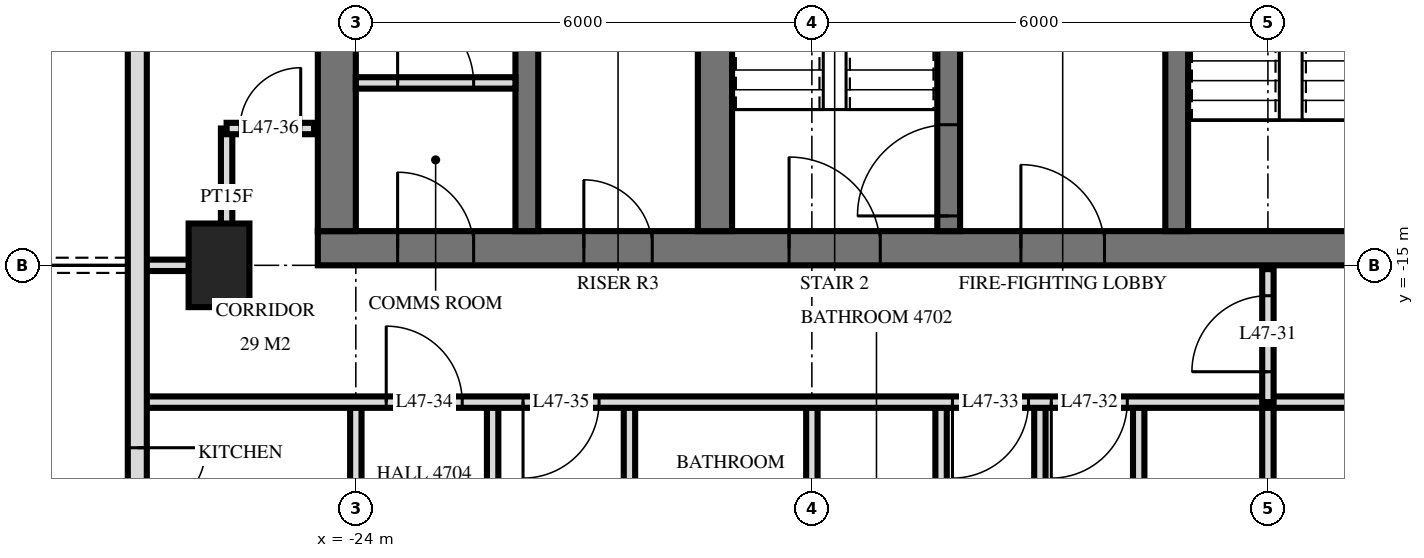
"""IFC4 building model, lengths in metres.
Left out: names, types, materials, properties, quantities, classifications, styles, units other than length and angle.
Written with IfcOpenShell. Run it as: python <this file> out.ifc"""

import sys

from ifc_helpers import new_model, si_unit, direction, frame, frame_2d, origin, origin_2d, place, context, subcontext, project, spatial, rectangle, extrude, element, fill, save


model = new_model("IFC4")
c1 = context("Model", 3, precision=1e-05, world=origin(), true_north=direction((0.0, 1.0)))
c2 = subcontext(c1, "Body", "Model", "MODEL_VIEW")
j1 = project(units=[si_unit("LENGTHUNIT", "METRE"), si_unit("PLANEANGLEUNIT", "RADIAN")], contexts=[c1])
p1 = place(None, origin())
s1 = spatial("IfcSite", under=j1, at=p1, CompositionType="ELEMENT")
p2 = place(p1, origin())
s2 = spatial("IfcBuilding", under=s1, at=p2, CompositionType="ELEMENT")
p3 = place(p2, frame((0.0, 0.0, 183.6)))
s3 = spatial("IfcBuildingStorey", under=s2, at=p3, CompositionType="ELEMENT", Elevation=183.6)
p4 = place(p3, frame((-25.8, -15.0, -0.28), z_axis=(0.0, 0.0, 1.0), x_axis=(0.0, 1.0, 0.0)))
e1 = element("IfcColumn", 1, at=p4, inside=s3, PredefinedType="COLUMN", context=c2, shape_type="SweptSolid", body=[
    extrude(rectangle(XDim=1.1, YDim=0.8, at=origin_2d()), origin(), (0.0, 0.0, 1.0), 3.78),
])
p5 = place(p3, frame((-24.5, -14.775, 0.0), z_axis=(0.0, 0.0, 1.0), x_axis=(1.0, 0.0, 0.0)))
e2 = element("IfcWall", 2, at=p5, inside=s3, PredefinedType="SHEAR", context=c2, shape_type="SweptSolid", body=[
    extrude(rectangle(XDim=14.5, YDim=0.45, at=frame_2d((7.25, 0.0))), origin(), (0.0, 0.0, 1.0), 3.5),
])
p6 = place(p5, frame((6.2, 0.0, 0.0)))
e3 = element("IfcOpeningElement", 3, at=p6, cuts=e2, PredefinedType="OPENING", context=c2, shape_type="SweptSolid", body=[
    extrude(rectangle(XDim=1.2, YDim=2.1, at=frame_2d((0.6, 1.05))), frame((0.0, 0.235, 0.0), z_axis=(0.0, -1.0, 0.0), x_axis=(1.0, 0.0, 0.0)), (0.0, 0.0, 1.0), 0.47),
])
p7 = place(p5, frame((9.25, 0.0, 0.0)))
e4 = element("IfcOpeningElement", 4, at=p7, cuts=e2, PredefinedType="OPENING", context=c2, shape_type="SweptSolid", body=[
    extrude(rectangle(XDim=1.1, YDim=2.1, at=frame_2d((0.55, 1.05))), frame((0.0, 0.235, 0.0), z_axis=(0.0, -1.0, 0.0), x_axis=(1.0, 0.0, 0.0)), (0.0, 0.0, 1.0), 0.47),
])
p8 = place(p5, frame((3.5, 0.0, 0.0)))
e5 = element("IfcOpeningElement", 5, at=p8, cuts=e2, PredefinedType="OPENING", context=c2, shape_type="SweptSolid", body=[
    extrude(rectangle(XDim=0.9, YDim=2.1, at=frame_2d((0.45, 1.05))), frame((0.0, 0.235, 0.0), z_axis=(0.0, -1.0, 0.0), x_axis=(1.0, 0.0, 0.0)), (0.0, 0.0, 1.0), 0.47),
])
p9 = place(p5, frame((1.05, 0.0, 0.0)))
e6 = element("IfcOpeningElement", 6, at=p9, cuts=e2, PredefinedType="OPENING", context=c2, shape_type="SweptSolid", body=[
    extrude(rectangle(XDim=1.0, YDim=2.1, at=frame_2d((0.5, 1.05))), frame((0.0, 0.235, 0.0), z_axis=(0.0, -1.0, 0.0), x_axis=(1.0, 0.0, 0.0)), (0.0, 0.0, 1.0), 0.47),
])
p10 = place(p3, frame((-24.25, -14.55, 0.0), z_axis=(0.0, 0.0, 1.0), x_axis=(0.0, 1.0, 0.0)))
e7 = element("IfcWall", 7, at=p10, inside=s3, PredefinedType="SHEAR", context=c2, shape_type="SweptSolid", body=[
    extrude(rectangle(XDim=14.1, YDim=0.5, at=frame_2d((7.05, 0.0))), origin(), (0.0, 0.0, 1.0), 3.5),
])
p11 = place(p3, frame((-13.2, -14.55, 0.0), z_axis=(0.0, 0.0, 1.0), x_axis=(0.0, 1.0, 0.0)))
e8 = element("IfcWall", 8, at=p11, inside=s3, PredefinedType="SHEAR", context=c2, shape_type="SweptSolid", body=[
    extrude(rectangle(XDim=5.4, YDim=0.3, at=frame_2d((2.7, 0.0))), origin(), (0.0, 0.0, 1.0), 3.5),
])
p12 = place(p11, frame((4.0, 0.0, 0.0)))
e9 = element("IfcOpeningElement", 9, at=p12, cuts=e8, PredefinedType="OPENING", context=c2, shape_type="SweptSolid", body=[
    extrude(rectangle(XDim=1.2, YDim=2.1, at=frame_2d((0.6, 1.05))), frame((0.0, 0.16, 0.0), z_axis=(0.0, -1.0, 0.0), x_axis=(1.0, 0.0, 0.0)), (0.0, 0.0, 1.0), 0.32),
])
p13 = place(p3, frame((-16.2, -14.55, 0.0), z_axis=(0.0, 0.0, 1.0), x_axis=(0.0, 1.0, 0.0)))
e10 = element("IfcWall", 10, at=p13, inside=s3, PredefinedType="SHEAR", context=c2, shape_type="SweptSolid", body=[
    extrude(rectangle(XDim=5.4, YDim=0.3, at=frame_2d((2.7, 0.0))), origin(), (0.0, 0.0, 1.0), 3.5),
])
p14 = place(p13, frame((0.2, 0.0, 0.0)))
e11 = element("IfcOpeningElement", 11, at=p14, cuts=e10, PredefinedType="OPENING", context=c2, shape_type="SweptSolid", body=[
    extrude(rectangle(XDim=1.2, YDim=2.1, at=frame_2d((0.6, 1.05))), frame((0.0, 0.16, 0.0), z_axis=(0.0, -1.0, 0.0), x_axis=(1.0, 0.0, 0.0)), (0.0, 0.0, 1.0), 0.32),
])
p15 = place(p3, frame((-19.275, -14.55, 0.0), z_axis=(0.0, 0.0, 1.0), x_axis=(0.0, 1.0, 0.0)))
e12 = element("IfcWall", 12, at=p15, inside=s3, PredefinedType="SHEAR", context=c2, shape_type="SweptSolid", body=[
    extrude(rectangle(XDim=5.4, YDim=0.45, at=frame_2d((2.7, 0.0))), origin(), (0.0, 0.0, 1.0), 3.5),
])
p16 = place(p3, frame((-21.75, -14.55, 0.0), z_axis=(0.0, 0.0, 1.0), x_axis=(0.0, 1.0, 0.0)))
e13 = element("IfcWall", 13, at=p16, inside=s3, PredefinedType="SHEAR", context=c2, shape_type="SweptSolid", body=[
    extrude(rectangle(XDim=5.4, YDim=0.3, at=frame_2d((2.7, 0.0))), origin(), (0.0, 0.0, 1.0), 3.5),
])
p17 = place(p3, frame((-26.875, -3.325, 0.0), z_axis=(0.0, 0.0, 1.0), x_axis=(0.0, -1.0, 0.0)))
e14 = element("IfcWall", 14, at=p17, inside=s3, PredefinedType="SOLIDWALL", context=c2, shape_type="SweptSolid", body=[
    extrude(rectangle(XDim=21.551, YDim=0.25, at=frame_2d((10.775, 0.0))), origin(), (0.0, 0.0, 1.0), 3.22),
])
p18 = place(p17, frame((7.025, 0.0, 0.0)))
e15 = element("IfcOpeningElement", 15, at=p18, cuts=e14, PredefinedType="OPENING", context=c2, shape_type="SweptSolid", body=[
    extrude(rectangle(XDim=1.8, YDim=2.4, at=frame_2d((0.9, 1.2))), frame((0.0, 0.135, 0.0), z_axis=(0.0, -1.0, 0.0), x_axis=(1.0, 0.0, 0.0)), (0.0, 0.0, 1.0), 0.27),
])
p19 = place(p17, frame((14.075, 0.0, 0.0)))
e16 = element("IfcOpeningElement", 16, at=p19, cuts=e14, PredefinedType="OPENING", context=c2, shape_type="SweptSolid", body=[
    extrude(rectangle(XDim=1.8, YDim=2.4, at=frame_2d((0.9, 1.2))), frame((0.0, 0.135, 0.0), z_axis=(0.0, -1.0, 0.0), x_axis=(1.0, 0.0, 0.0)), (0.0, 0.0, 1.0), 0.27),
])
p20 = place(p17, frame((18.875, 0.0, 0.0)))
e17 = element("IfcOpeningElement", 17, at=p20, cuts=e14, PredefinedType="OPENING", context=c2, shape_type="SweptSolid", body=[
    extrude(rectangle(XDim=1.8, YDim=2.4, at=frame_2d((0.9, 1.2))), frame((0.0, 0.135, 0.0), z_axis=(0.0, -1.0, 0.0), x_axis=(1.0, 0.0, 0.0)), (0.0, 0.0, 1.0), 0.27),
])
p21 = place(p3, frame((-24.0, -12.6, 0.0), z_axis=(0.0, 0.0, 1.0), x_axis=(1.0, 0.0, 0.0)))
e18 = element("IfcWall", 18, at=p21, inside=s3, PredefinedType="PARTITIONING", context=c2, shape_type="SweptSolid", body=[
    extrude(rectangle(XDim=2.1, YDim=0.15, at=frame_2d((1.05, 0.0))), origin(), (0.0, 0.0, 1.0), 3.2),
])
p22 = place(p21, frame((0.55, 0.0, 0.0)))
e19 = element("IfcOpeningElement", 19, at=p22, cuts=e18, PredefinedType="OPENING", context=c2, shape_type="SweptSolid", body=[
    extrude(rectangle(XDim=1.0, YDim=2.1, at=frame_2d((0.5, 1.05))), frame((0.0, 0.085, 0.0), z_axis=(0.0, -1.0, 0.0), x_axis=(1.0, 0.0, 0.0)), (0.0, 0.0, 1.0), 0.17),
])
p23 = place(p3, frame((-12.0, -16.8, 0.0), z_axis=(0.0, 0.0, 1.0), x_axis=(0.0, 1.0, 0.0)))
e20 = element("IfcWall", 20, at=p23, inside=s3, PredefinedType="PARTITIONING", context=c2, shape_type="SweptSolid", body=[
    extrude(rectangle(XDim=1.75, YDim=0.15, at=frame_2d((0.875, 0.0))), origin(), (0.0, 0.0, 1.0), 3.22),
])
p24 = place(p23, frame((0.4, 0.0, 0.0)))
e21 = element("IfcOpeningElement", 21, at=p24, cuts=e20, PredefinedType="OPENING", context=c2, shape_type="SweptSolid", body=[
    extrude(rectangle(XDim=1.0, YDim=2.1, at=frame_2d((0.5, 1.05))), frame((0.0, 0.085, 0.0), z_axis=(0.0, -1.0, 0.0), x_axis=(1.0, 0.0, 0.0)), (0.0, 0.0, 1.0), 0.17),
])
p25 = place(p3, frame((-12.0, -29.22, 0.0), z_axis=(0.0, 0.0, 1.0), x_axis=(0.0, 1.0, 0.0)))
e22 = element("IfcWall", 22, at=p25, inside=s3, PredefinedType="PARTITIONING", context=c2, shape_type="SweptSolid", body=[
    extrude(rectangle(XDim=12.42, YDim=0.15, at=frame_2d((6.21, 0.0))), origin(), (0.0, 0.0, 1.0), 3.22),
])
p26 = place(p3, frame((-13.7, -19.8, 0.0), z_axis=(0.0, 0.0, 1.0), x_axis=(0.0, 1.0, 0.0)))
e23 = element("IfcWall", 23, at=p26, inside=s3, PredefinedType="PARTITIONING", context=c2, shape_type="SweptSolid", body=[
    extrude(rectangle(XDim=3.0, YDim=0.15, at=frame_2d((1.5, 0.0))), origin(), (0.0, 0.0, 1.0), 3.22),
])
p27 = place(p26, frame((1.1, 0.0, 0.0)))
e24 = element("IfcOpeningElement", 24, at=p27, cuts=e23, PredefinedType="OPENING", context=c2, shape_type="SweptSolid", body=[
    extrude(rectangle(XDim=0.8, YDim=2.1, at=frame_2d((0.4, 1.05))), frame((0.0, 0.085, 0.0), z_axis=(0.0, -1.0, 0.0), x_axis=(1.0, 0.0, 0.0)), (0.0, 0.0, 1.0), 0.17),
])
p28 = place(p3, frame((-15.0, -29.22, 0.0), z_axis=(0.0, 0.0, 1.0), x_axis=(0.0, 1.0, 0.0)))
e25 = element("IfcWall", 25, at=p28, inside=s3, PredefinedType="PARTITIONING", context=c2, shape_type="SweptSolid", body=[
    extrude(rectangle(XDim=12.42, YDim=0.15, at=frame_2d((6.21, 0.0))), origin(), (0.0, 0.0, 1.0), 3.22),
])
p29 = place(p3, frame((-16.3, -19.8, 0.0), z_axis=(0.0, 0.0, 1.0), x_axis=(0.0, 1.0, 0.0)))
e26 = element("IfcWall", 26, at=p29, inside=s3, PredefinedType="PARTITIONING", context=c2, shape_type="SweptSolid", body=[
    extrude(rectangle(XDim=3.0, YDim=0.15, at=frame_2d((1.5, 0.0))), origin(), (0.0, 0.0, 1.0), 3.22),
])
p30 = place(p29, frame((1.1, 0.0, 0.0)))
e27 = element("IfcOpeningElement", 27, at=p30, cuts=e26, PredefinedType="OPENING", context=c2, shape_type="SweptSolid", body=[
    extrude(rectangle(XDim=0.8, YDim=2.1, at=frame_2d((0.4, 1.05))), frame((0.0, 0.085, 0.0), z_axis=(0.0, -1.0, 0.0), x_axis=(1.0, 0.0, 0.0)), (0.0, 0.0, 1.0), 0.17),
])
p31 = place(p3, frame((-18.0, -29.22, 0.0), z_axis=(0.0, 0.0, 1.0), x_axis=(0.0, 1.0, 0.0)))
e28 = element("IfcWall", 28, at=p31, inside=s3, PredefinedType="PARTITIONING", context=c2, shape_type="SweptSolid", body=[
    extrude(rectangle(XDim=12.42, YDim=0.15, at=frame_2d((6.21, 0.0))), origin(), (0.0, 0.0, 1.0), 3.22),
])
for number, where, z_axis, x_axis in (
    (29, (-20.4, -19.8, 0.0), (0.0, 0.0, 1.0), (0.0, 1.0, 0.0)),
    (30, (-22.2, -19.8, 0.0), (0.0, 0.0, 1.0), (0.0, 1.0, 0.0)),
):
    element("IfcWall", number, at=place(p3, frame(where, z_axis=z_axis, x_axis=x_axis)), inside=s3, PredefinedType="PARTITIONING", context=c2, shape_type="SweptSolid", body=[
        extrude(rectangle(XDim=3.0, YDim=0.15, at=frame_2d((1.5, 0.0))), origin(), (0.0, 0.0, 1.0), 3.22),
    ])
p32 = place(p3, frame((-24.0, -19.8, 0.0), z_axis=(0.0, 0.0, 1.0), x_axis=(0.0, 1.0, 0.0)))
e31 = element("IfcWall", 31, at=p32, inside=s3, PredefinedType="PARTITIONING", context=c2, shape_type="SweptSolid", body=[
    extrude(rectangle(XDim=3.0, YDim=0.15, at=frame_2d((1.5, 0.0))), origin(), (0.0, 0.0, 1.0), 3.22),
])
p33 = place(p32, frame((0.98, 0.0, 0.0)))
e32 = element("IfcOpeningElement", 32, at=p33, cuts=e31, PredefinedType="OPENING", context=c2, shape_type="SweptSolid", body=[
    extrude(rectangle(XDim=1.0, YDim=2.1, at=frame_2d((0.5, 1.05))), frame((0.0, 0.085, 0.0), z_axis=(0.0, -1.0, 0.0), x_axis=(1.0, 0.0, 0.0)), (0.0, 0.0, 1.0), 0.17),
])
p34 = place(p3, frame((-25.7, -15.0, 0.0), z_axis=(0.0, 0.0, 1.0), x_axis=(0.0, 1.0, 0.0)))
e33 = element("IfcWall", 33, at=p34, inside=s3, PredefinedType="PARTITIONING", context=c2, shape_type="SweptSolid", body=[
    extrude(rectangle(XDim=1.8, YDim=0.15, at=frame_2d((0.9, 0.0))), origin(), (0.0, 0.0, 1.0), 3.22),
])
p35 = place(p3, frame((-26.82, -16.8, 0.0), z_axis=(0.0, 0.0, 1.0), x_axis=(1.0, 0.0, 0.0)))
e34 = element("IfcWall", 34, at=p35, inside=s3, PredefinedType="PARTITIONING", context=c2, shape_type="SweptSolid", body=[
    extrude(rectangle(XDim=53.64, YDim=0.15, at=frame_2d((26.82, 0.0))), origin(), (0.0, 0.0, 1.0), 3.22),
])
p36 = place(p35, frame((11.97, 0.0, 0.0)))
e35 = element("IfcOpeningElement", 35, at=p36, cuts=e34, PredefinedType="OPENING", context=c2, shape_type="SweptSolid", body=[
    extrude(rectangle(XDim=1.0, YDim=2.1, at=frame_2d((0.5, 1.05))), frame((0.0, 0.085, 0.0), z_axis=(0.0, -1.0, 0.0), x_axis=(1.0, 0.0, 0.0)), (0.0, 0.0, 1.0), 0.17),
])
p37 = place(p35, frame((10.67, 0.0, 0.0)))
e36 = element("IfcOpeningElement", 36, at=p37, cuts=e34, PredefinedType="OPENING", context=c2, shape_type="SweptSolid", body=[
    extrude(rectangle(XDim=1.0, YDim=2.1, at=frame_2d((0.5, 1.05))), frame((0.0, 0.085, 0.0), z_axis=(0.0, -1.0, 0.0), x_axis=(1.0, 0.0, 0.0)), (0.0, 0.0, 1.0), 0.17),
])
p38 = place(p35, frame((3.22, 0.0, 0.0)))
e37 = element("IfcOpeningElement", 37, at=p38, cuts=e34, PredefinedType="OPENING", context=c2, shape_type="SweptSolid", body=[
    extrude(rectangle(XDim=1.0, YDim=2.1, at=frame_2d((0.5, 1.05))), frame((0.0, 0.085, 0.0), z_axis=(0.0, -1.0, 0.0), x_axis=(1.0, 0.0, 0.0)), (0.0, 0.0, 1.0), 0.17),
])
p39 = place(p35, frame((5.02, 0.0, 0.0)))
e38 = element("IfcOpeningElement", 38, at=p39, cuts=e34, PredefinedType="OPENING", context=c2, shape_type="SweptSolid", body=[
    extrude(rectangle(XDim=1.0, YDim=2.1, at=frame_2d((0.5, 1.05))), frame((0.0, 0.085, 0.0), z_axis=(0.0, -1.0, 0.0), x_axis=(1.0, 0.0, 0.0)), (0.0, 0.0, 1.0), 0.17),
])
p40 = place(p35, frame((38.97, 0.0, 0.0)))
e39 = element("IfcOpeningElement", 39, at=p40, cuts=e34, PredefinedType="OPENING", context=c2, shape_type="SweptSolid", body=[
    extrude(rectangle(XDim=1.0, YDim=2.1, at=frame_2d((0.5, 1.05))), frame((0.0, 0.085, 0.0), z_axis=(0.0, -1.0, 0.0), x_axis=(1.0, 0.0, 0.0)), (0.0, 0.0, 1.0), 0.17),
])
p41 = place(p35, frame((48.72, 0.0, 0.0)))
e40 = element("IfcOpeningElement", 40, at=p41, cuts=e34, PredefinedType="OPENING", context=c2, shape_type="SweptSolid", body=[
    extrude(rectangle(XDim=1.0, YDim=2.1, at=frame_2d((0.5, 1.05))), frame((0.0, 0.085, 0.0), z_axis=(0.0, -1.0, 0.0), x_axis=(1.0, 0.0, 0.0)), (0.0, 0.0, 1.0), 0.17),
])
p42 = place(p35, frame((46.92, 0.0, 0.0)))
e41 = element("IfcOpeningElement", 41, at=p42, cuts=e34, PredefinedType="OPENING", context=c2, shape_type="SweptSolid", body=[
    extrude(rectangle(XDim=1.0, YDim=2.1, at=frame_2d((0.5, 1.05))), frame((0.0, 0.085, 0.0), z_axis=(0.0, -1.0, 0.0), x_axis=(1.0, 0.0, 0.0)), (0.0, 0.0, 1.0), 0.17),
])
p43 = place(p35, frame((18.32, 0.0, 0.0)))
e42 = element("IfcOpeningElement", 42, at=p43, cuts=e34, PredefinedType="OPENING", context=c2, shape_type="SweptSolid", body=[
    extrude(rectangle(XDim=1.0, YDim=2.1, at=frame_2d((0.5, 1.05))), frame((0.0, 0.085, 0.0), z_axis=(0.0, -1.0, 0.0), x_axis=(1.0, 0.0, 0.0)), (0.0, 0.0, 1.0), 0.17),
])
p44 = place(p35, frame((26.32, 0.0, 0.0)))
e43 = element("IfcOpeningElement", 43, at=p44, cuts=e34, PredefinedType="OPENING", context=c2, shape_type="SweptSolid", body=[
    extrude(rectangle(XDim=1.0, YDim=2.1, at=frame_2d((0.5, 1.05))), frame((0.0, 0.085, 0.0), z_axis=(0.0, -1.0, 0.0), x_axis=(1.0, 0.0, 0.0)), (0.0, 0.0, 1.0), 0.17),
])
p45 = place(p35, frame((34.32, 0.0, 0.0)))
e44 = element("IfcOpeningElement", 44, at=p45, cuts=e34, PredefinedType="OPENING", context=c2, shape_type="SweptSolid", body=[
    extrude(rectangle(XDim=1.0, YDim=2.1, at=frame_2d((0.5, 1.05))), frame((0.0, 0.085, 0.0), z_axis=(0.0, -1.0, 0.0), x_axis=(1.0, 0.0, 0.0)), (0.0, 0.0, 1.0), 0.17),
])
p46 = place(p3, frame((-26.82, -15.0, 0.0), z_axis=(0.0, 0.0, 1.0), x_axis=(1.0, 0.0, 0.0)))
e45 = element("IfcWall", 45, at=p46, inside=s3, PredefinedType="PARTITIONING", context=c2, shape_type="SweptSolid", body=[
    extrude(rectangle(XDim=1.12, YDim=0.15, at=frame_2d((0.56, 0.0))), origin(), (0.0, 0.0, 1.0), 3.22),
])
p47 = place(p3, frame((-25.7, -13.2, 0.0), z_axis=(0.0, 0.0, 1.0), x_axis=(1.0, 0.0, 0.0)))
e46 = element("IfcWall", 46, at=p47, inside=s3, PredefinedType="PARTITIONING", context=c2, shape_type="SweptSolid", body=[
    extrude(rectangle(XDim=1.15, YDim=0.15, at=frame_2d((0.575, 0.0))), origin(), (0.0, 0.0, 1.0), 3.22),
])
p48 = place(p47, frame((0.175, 0.0, 0.0)))
e47 = element("IfcOpeningElement", 47, at=p48, cuts=e46, PredefinedType="OPENING", context=c2, shape_type="SweptSolid", body=[
    extrude(rectangle(XDim=0.8, YDim=2.1, at=frame_2d((0.4, 1.05))), frame((0.0, 0.085, 0.0), z_axis=(0.0, -1.0, 0.0), x_axis=(1.0, 0.0, 0.0)), (0.0, 0.0, 1.0), 0.17),
])
p49 = place(p19, origin())
e48 = element("IfcDoor", 48, at=p49, inside=s3, OperationType="DOUBLE_DOOR_SINGLE_SWING", PredefinedType="DOOR", context=c2, shape_type="SweptSolid", body=[
    extrude(rectangle(XDim=1.8, YDim=2.4, at=frame_2d((0.9, 1.2))), frame((0.0, 0.025, 0.0), z_axis=(0.0, -1.0, 0.0), x_axis=(1.0, 0.0, 0.0)), (0.0, 0.0, 1.0), 0.05),
])
fill(e16, e48)
p50 = place(p6, origin())
e49 = element("IfcDoor", 49, at=p50, inside=s3, OperationType="SINGLE_SWING_RIGHT", PredefinedType="DOOR", context=c2, shape_type="SweptSolid", body=[
    extrude(rectangle(XDim=1.2, YDim=2.1, at=frame_2d((0.6, 1.05))), frame((0.0, 0.025, 0.0), z_axis=(0.0, -1.0, 0.0), x_axis=(1.0, 0.0, 0.0)), (0.0, 0.0, 1.0), 0.05),
])
fill(e3, e49)
p51 = place(p7, origin())
e50 = element("IfcDoor", 50, at=p51, inside=s3, OperationType="SINGLE_SWING_RIGHT", PredefinedType="DOOR", context=c2, shape_type="SweptSolid", body=[
    extrude(rectangle(XDim=1.1, YDim=2.1, at=frame_2d((0.55, 1.05))), frame((0.0, 0.025, 0.0), z_axis=(0.0, -1.0, 0.0), x_axis=(1.0, 0.0, 0.0)), (0.0, 0.0, 1.0), 0.05),
])
fill(e4, e50)
p52 = place(p8, origin())
e51 = element("IfcDoor", 51, at=p52, inside=s3, OperationType="SINGLE_SWING_RIGHT", PredefinedType="DOOR", context=c2, shape_type="SweptSolid", body=[
    extrude(rectangle(XDim=0.9, YDim=2.1, at=frame_2d((0.45, 1.05))), frame((0.0, 0.025, 0.0), z_axis=(0.0, -1.0, 0.0), x_axis=(1.0, 0.0, 0.0)), (0.0, 0.0, 1.0), 0.05),
])
fill(e5, e51)
p53 = place(p9, origin())
e52 = element("IfcDoor", 52, at=p53, inside=s3, OperationType="SINGLE_SWING_RIGHT", PredefinedType="DOOR", context=c2, shape_type="SweptSolid", body=[
    extrude(rectangle(XDim=1.0, YDim=2.1, at=frame_2d((0.5, 1.05))), frame((0.0, 0.025, 0.0), z_axis=(0.0, -1.0, 0.0), x_axis=(1.0, 0.0, 0.0)), (0.0, 0.0, 1.0), 0.05),
])
fill(e6, e52)
p54 = place(p14, origin())
e53 = element("IfcDoor", 53, at=p54, inside=s3, OperationType="SINGLE_SWING_RIGHT", PredefinedType="DOOR", context=c2, shape_type="SweptSolid", body=[
    extrude(rectangle(XDim=1.2, YDim=2.1, at=frame_2d((0.6, 1.05))), frame((0.0, 0.025, 0.0), z_axis=(0.0, -1.0, 0.0), x_axis=(1.0, 0.0, 0.0)), (0.0, 0.0, 1.0), 0.05),
])
fill(e11, e53)
p55 = place(p22, origin())
e54 = element("IfcDoor", 54, at=p55, inside=s3, OperationType="SINGLE_SWING_RIGHT", PredefinedType="DOOR", context=c2, shape_type="SweptSolid", body=[
    extrude(rectangle(XDim=1.0, YDim=2.1, at=frame_2d((0.5, 1.05))), frame((0.0, 0.025, 0.0), z_axis=(0.0, -1.0, 0.0), x_axis=(1.0, 0.0, 0.0)), (0.0, 0.0, 1.0), 0.05),
])
fill(e19, e54)
p56 = place(p24, origin())
e55 = element("IfcDoor", 55, at=p56, inside=s3, OperationType="SINGLE_SWING_RIGHT", PredefinedType="DOOR", context=c2, shape_type="SweptSolid", body=[
    extrude(rectangle(XDim=1.0, YDim=2.1, at=frame_2d((0.5, 1.05))), frame((0.0, 0.025, 0.0), z_axis=(0.0, -1.0, 0.0), x_axis=(1.0, 0.0, 0.0)), (0.0, 0.0, 1.0), 0.05),
])
fill(e21, e55)
p57 = place(p36, frame((0.5, 0.0, 0.0), z_axis=(0.0, 0.0, 1.0), x_axis=(-1.0, 0.0, 0.0)))
e56 = element("IfcDoor", 56, at=p57, inside=s3, OperationType="SINGLE_SWING_LEFT", PredefinedType="DOOR", context=c2, shape_type="SweptSolid", body=[
    extrude(rectangle(XDim=1.0, YDim=2.1, at=frame_2d((0.0, 1.05))), frame((0.0, -0.025, 0.0), z_axis=(0.0, 1.0, 0.0), x_axis=(-1.0, 0.0, 0.0)), (0.0, 0.0, 1.0), 0.05),
])
fill(e35, e56)
p58 = place(p37, frame((0.5, 0.0, 0.0), z_axis=(0.0, 0.0, 1.0), x_axis=(-1.0, 0.0, 0.0)))
e57 = element("IfcDoor", 57, at=p58, inside=s3, OperationType="SINGLE_SWING_LEFT", PredefinedType="DOOR", context=c2, shape_type="SweptSolid", body=[
    extrude(rectangle(XDim=1.0, YDim=2.1, at=frame_2d((0.0, 1.05))), frame((0.0, -0.025, 0.0), z_axis=(0.0, 1.0, 0.0), x_axis=(-1.0, 0.0, 0.0)), (0.0, 0.0, 1.0), 0.05),
])
fill(e36, e57)
p59 = place(p38, origin())
e58 = element("IfcDoor", 58, at=p59, inside=s3, OperationType="SINGLE_SWING_RIGHT", PredefinedType="DOOR", context=c2, shape_type="SweptSolid", body=[
    extrude(rectangle(XDim=1.0, YDim=2.1, at=frame_2d((0.5, 1.05))), frame((0.0, 0.025, 0.0), z_axis=(0.0, -1.0, 0.0), x_axis=(1.0, 0.0, 0.0)), (0.0, 0.0, 1.0), 0.05),
])
fill(e37, e58)
p60 = place(p39, frame((0.5, 0.0, 0.0), z_axis=(0.0, 0.0, 1.0), x_axis=(-1.0, 0.0, 0.0)))
e59 = element("IfcDoor", 59, at=p60, inside=s3, OperationType="SINGLE_SWING_LEFT", PredefinedType="DOOR", context=c2, shape_type="SweptSolid", body=[
    extrude(rectangle(XDim=1.0, YDim=2.1, at=frame_2d((0.0, 1.05))), frame((0.0, -0.025, 0.0), z_axis=(0.0, 1.0, 0.0), x_axis=(-1.0, 0.0, 0.0)), (0.0, 0.0, 1.0), 0.05),
])
fill(e38, e59)
p61 = place(p48, origin())
e60 = element("IfcDoor", 60, at=p61, inside=s3, OperationType="SINGLE_SWING_LEFT", PredefinedType="DOOR", context=c2, shape_type="SweptSolid", body=[
    extrude(rectangle(XDim=0.8, YDim=2.1, at=frame_2d((0.4, 1.05))), frame((0.0, 0.025, 0.0), z_axis=(0.0, -1.0, 0.0), x_axis=(1.0, 0.0, 0.0)), (0.0, 0.0, 1.0), 0.05),
])
fill(e47, e60)
save(model, sys.argv[1])
